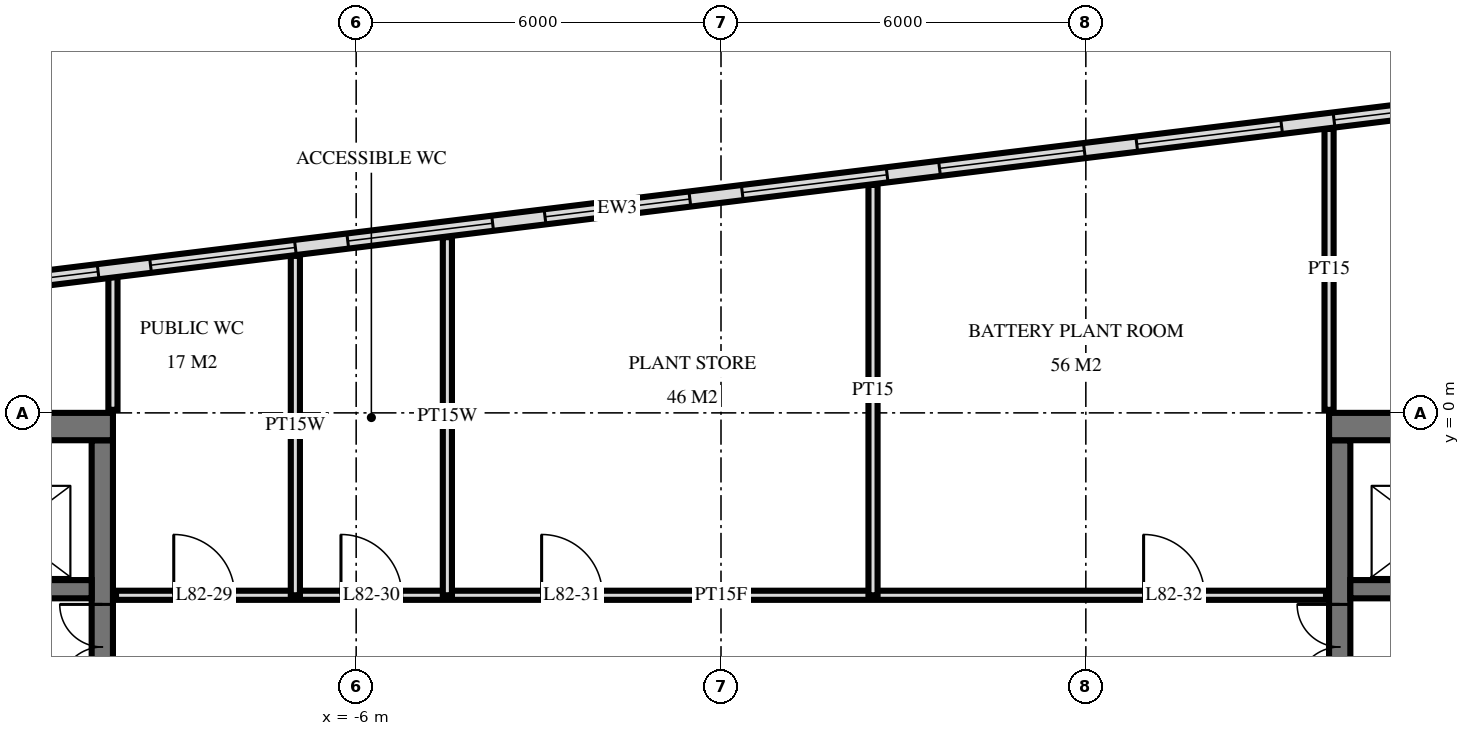
"""IFC4 building model, lengths in metres.
Left out: names, types, materials, properties, quantities, classifications, styles, units other than length and angle.
Written with IfcOpenShell. Run it as: python <this file> out.ifc"""

import sys

from ifc_helpers import new_model, si_unit, direction, frame, frame_2d, origin, place, context, subcontext, project, spatial, rectangle, extrude, element, fill, save


model = new_model("IFC4")
c1 = context("Model", 3, precision=1e-05, world=origin(), true_north=direction((0.0, 1.0)))
c2 = subcontext(c1, "Body", "Model", "MODEL_VIEW")
j1 = project(units=[si_unit("LENGTHUNIT", "METRE"), si_unit("PLANEANGLEUNIT", "RADIAN")], contexts=[c1])
p1 = place(None, origin())
s1 = spatial("IfcSite", under=j1, at=p1, CompositionType="ELEMENT")
p2 = place(p1, origin())
s2 = spatial("IfcBuilding", under=s1, at=p2, CompositionType="ELEMENT")
p3 = place(p2, frame((0.0, 0.0, 308.6)))
s3 = spatial("IfcBuildingStorey", under=s2, at=p3, CompositionType="ELEMENT", Elevation=308.6)
p4 = place(p3, frame((-19.5, -0.225, 0.0), z_axis=(0.0, 0.0, 1.0), x_axis=(1.0, 0.0, 0.0)))
e1 = element("IfcWall", 1, at=p4, inside=s3, PredefinedType="SHEAR", context=c2, shape_type="SweptSolid", body=[
    extrude(rectangle(XDim=9.5, YDim=0.45, at=frame_2d((4.75, 0.0))), origin(), (0.0, 0.0, 1.0), 6.0),
])
p5 = place(p3, frame((-10.175, -14.55, 0.0), z_axis=(0.0, 0.0, 1.0), x_axis=(0.0, 1.0, 0.0)))
e2 = element("IfcWall", 2, at=p5, inside=s3, PredefinedType="SHEAR", context=c2, shape_type="SweptSolid", body=[
    extrude(rectangle(XDim=14.1, YDim=0.35, at=frame_2d((7.05, 0.0))), origin(), (0.0, 0.0, 1.0), 6.0),
])
p6 = place(p5, frame((8.4, 0.0, 0.0)))
e3 = element("IfcOpeningElement", 3, at=p6, cuts=e2, PredefinedType="OPENING", context=c2, shape_type="SweptSolid", body=[
    extrude(rectangle(XDim=1.4, YDim=2.4, at=frame_2d((0.7, 1.2))), frame((0.0, 0.185, 0.0), z_axis=(0.0, -1.0, 0.0), x_axis=(1.0, 0.0, 0.0)), (0.0, 0.0, 1.0), 0.37),
])
p7 = place(p5, frame((10.0, 0.0, 0.0)))
e4 = element("IfcOpeningElement", 4, at=p7, cuts=e2, PredefinedType="OPENING", context=c2, shape_type="SweptSolid", body=[
    extrude(rectangle(XDim=1.4, YDim=2.4, at=frame_2d((0.7, 1.2))), frame((0.0, 0.185, 0.0), z_axis=(0.0, -1.0, 0.0), x_axis=(1.0, 0.0, 0.0)), (0.0, 0.0, 1.0), 0.37),
])
p8 = place(p5, frame((4.0, 0.0, 0.0)))
e5 = element("IfcOpeningElement", 5, at=p8, cuts=e2, PredefinedType="OPENING", context=c2, shape_type="SweptSolid", body=[
    extrude(rectangle(XDim=1.2, YDim=2.1, at=frame_2d((0.6, 1.05))), frame((0.0, 0.185, 0.0), z_axis=(0.0, -1.0, 0.0), x_axis=(1.0, 0.0, 0.0)), (0.0, 0.0, 1.0), 0.37),
])
p9 = place(p3, frame((-19.05, -2.9, 0.0), z_axis=(0.0, 0.0, 1.0), x_axis=(1.0, 0.0, 0.0)))
e6 = element("IfcWall", 6, at=p9, inside=s3, PredefinedType="SHEAR", context=c2, shape_type="SweptSolid", body=[
    extrude(rectangle(XDim=8.7, YDim=0.3, at=frame_2d((4.35, 0.0))), origin(), (0.0, 0.0, 1.0), 6.0),
])
p10 = place(p9, frame((6.8, 0.0, 0.0)))
e7 = element("IfcOpeningElement", 7, at=p10, cuts=e6, PredefinedType="OPENING", context=c2, shape_type="SweptSolid", body=[
    extrude(rectangle(XDim=1.1, YDim=2.1, at=frame_2d((0.55, 1.05))), frame((0.0, 0.16, 0.0), z_axis=(0.0, -1.0, 0.0), x_axis=(1.0, 0.0, 0.0)), (0.0, 0.0, 1.0), 0.32),
])
p11 = place(p9, frame((3.8, 0.0, 0.0)))
e8 = element("IfcOpeningElement", 8, at=p11, cuts=e6, PredefinedType="OPENING", context=c2, shape_type="SweptSolid", body=[
    extrude(rectangle(XDim=1.1, YDim=2.1, at=frame_2d((0.55, 1.05))), frame((0.0, 0.16, 0.0), z_axis=(0.0, -1.0, 0.0), x_axis=(1.0, 0.0, 0.0)), (0.0, 0.0, 1.0), 0.32),
])
p12 = place(p9, frame((0.9, 0.0, 0.0)))
e9 = element("IfcOpeningElement", 9, at=p12, cuts=e6, PredefinedType="OPENING", context=c2, shape_type="SweptSolid", body=[
    extrude(rectangle(XDim=0.9, YDim=2.1, at=frame_2d((0.45, 1.05))), frame((0.0, 0.16, 0.0), z_axis=(0.0, -1.0, 0.0), x_axis=(1.0, 0.0, 0.0)), (0.0, 0.0, 1.0), 0.32),
])
p13 = place(p3, frame((10.0, -0.225, 0.0), z_axis=(0.0, 0.0, 1.0), x_axis=(1.0, 0.0, 0.0)))
e10 = element("IfcWall", 10, at=p13, inside=s3, PredefinedType="SHEAR", context=c2, shape_type="SweptSolid", body=[
    extrude(rectangle(XDim=9.5, YDim=0.45, at=frame_2d((4.75, 0.0))), origin(), (0.0, 0.0, 1.0), 6.0),
])
p14 = place(p3, frame((10.175, -14.55, 0.0), z_axis=(0.0, 0.0, 1.0), x_axis=(0.0, 1.0, 0.0)))
e11 = element("IfcWall", 11, at=p14, inside=s3, PredefinedType="SHEAR", context=c2, shape_type="SweptSolid", body=[
    extrude(rectangle(XDim=14.1, YDim=0.35, at=frame_2d((7.05, 0.0))), origin(), (0.0, 0.0, 1.0), 6.0),
])
p15 = place(p14, frame((8.4, 0.0, 0.0)))
e12 = element("IfcOpeningElement", 12, at=p15, cuts=e11, PredefinedType="OPENING", context=c2, shape_type="SweptSolid", body=[
    extrude(rectangle(XDim=1.4, YDim=2.4, at=frame_2d((0.7, 1.2))), frame((0.0, 0.185, 0.0), z_axis=(0.0, -1.0, 0.0), x_axis=(1.0, 0.0, 0.0)), (0.0, 0.0, 1.0), 0.37),
])
p16 = place(p14, frame((10.0, 0.0, 0.0)))
e13 = element("IfcOpeningElement", 13, at=p16, cuts=e11, PredefinedType="OPENING", context=c2, shape_type="SweptSolid", body=[
    extrude(rectangle(XDim=1.4, YDim=2.4, at=frame_2d((0.7, 1.2))), frame((0.0, 0.185, 0.0), z_axis=(0.0, -1.0, 0.0), x_axis=(1.0, 0.0, 0.0)), (0.0, 0.0, 1.0), 0.37),
])
p17 = place(p14, frame((4.0, 0.0, 0.0)))
e14 = element("IfcOpeningElement", 14, at=p17, cuts=e11, PredefinedType="OPENING", context=c2, shape_type="SweptSolid", body=[
    extrude(rectangle(XDim=1.2, YDim=2.1, at=frame_2d((0.6, 1.05))), frame((0.0, 0.185, 0.0), z_axis=(0.0, -1.0, 0.0), x_axis=(1.0, 0.0, 0.0)), (0.0, 0.0, 1.0), 0.37),
])
p18 = place(p3, frame((10.35, -2.9, 0.0), z_axis=(0.0, 0.0, 1.0), x_axis=(1.0, 0.0, 0.0)))
e15 = element("IfcWall", 15, at=p18, inside=s3, PredefinedType="SHEAR", context=c2, shape_type="SweptSolid", body=[
    extrude(rectangle(XDim=8.7, YDim=0.3, at=frame_2d((4.35, 0.0))), origin(), (0.0, 0.0, 1.0), 6.0),
])
p19 = place(p18, frame((0.8, 0.0, 0.0)))
e16 = element("IfcOpeningElement", 16, at=p19, cuts=e15, PredefinedType="OPENING", context=c2, shape_type="SweptSolid", body=[
    extrude(rectangle(XDim=1.1, YDim=2.1, at=frame_2d((0.55, 1.05))), frame((0.0, 0.16, 0.0), z_axis=(0.0, -1.0, 0.0), x_axis=(1.0, 0.0, 0.0)), (0.0, 0.0, 1.0), 0.32),
])
p20 = place(p18, frame((3.8, 0.0, 0.0)))
e17 = element("IfcOpeningElement", 17, at=p20, cuts=e15, PredefinedType="OPENING", context=c2, shape_type="SweptSolid", body=[
    extrude(rectangle(XDim=1.1, YDim=2.1, at=frame_2d((0.55, 1.05))), frame((0.0, 0.16, 0.0), z_axis=(0.0, -1.0, 0.0), x_axis=(1.0, 0.0, 0.0)), (0.0, 0.0, 1.0), 0.32),
])
p21 = place(p18, frame((6.9, 0.0, 0.0)))
e18 = element("IfcOpeningElement", 18, at=p21, cuts=e15, PredefinedType="OPENING", context=c2, shape_type="SweptSolid", body=[
    extrude(rectangle(XDim=0.9, YDim=2.1, at=frame_2d((0.45, 1.05))), frame((0.0, 0.16, 0.0), z_axis=(0.0, -1.0, 0.0), x_axis=(1.0, 0.0, 0.0)), (0.0, 0.0, 1.0), 0.32),
])
p22 = place(p3, frame((16.138, 5.561, 0.0), z_axis=(0.0, 0.0, 1.0), x_axis=(-0.992546726876, -0.121864658405, 0.0)))
e19 = element("IfcWall", 19, at=p22, inside=s3, PredefinedType="SOLIDWALL", context=c2, shape_type="SweptSolid", body=[
    extrude(rectangle(XDim=35.951, YDim=0.25, at=frame_2d((17.975, 0.0))), origin(), (0.0, 0.0, 1.0), 5.72),
])
p23 = place(p22, frame((0.434, 0.0, 0.858)))
e20 = element("IfcOpeningElement", 20, at=p23, cuts=e19, PredefinedType="OPENING", context=c2, shape_type="SweptSolid", body=[
    extrude(rectangle(XDim=2.4, YDim=3.6, at=frame_2d((1.2, 1.8))), frame((0.0, 0.135, 0.0), z_axis=(0.0, -1.0, 0.0), x_axis=(1.0, 0.0, 0.0)), (0.0, 0.0, 1.0), 0.27),
])
p24 = place(p22, frame((3.702, 0.0, 0.858)))
e21 = element("IfcOpeningElement", 21, at=p24, cuts=e19, PredefinedType="OPENING", context=c2, shape_type="SweptSolid", body=[
    extrude(rectangle(XDim=2.4, YDim=3.6, at=frame_2d((1.2, 1.8))), frame((0.0, 0.135, 0.0), z_axis=(0.0, -1.0, 0.0), x_axis=(1.0, 0.0, 0.0)), (0.0, 0.0, 1.0), 0.27),
])
p25 = place(p22, frame((6.971, 0.0, 0.858)))
e22 = element("IfcOpeningElement", 22, at=p25, cuts=e19, PredefinedType="OPENING", context=c2, shape_type="SweptSolid", body=[
    extrude(rectangle(XDim=2.4, YDim=3.6, at=frame_2d((1.2, 1.8))), frame((0.0, 0.135, 0.0), z_axis=(0.0, -1.0, 0.0), x_axis=(1.0, 0.0, 0.0)), (0.0, 0.0, 1.0), 0.27),
])
p26 = place(p22, frame((10.239, 0.0, 0.858)))
e23 = element("IfcOpeningElement", 23, at=p26, cuts=e19, PredefinedType="OPENING", context=c2, shape_type="SweptSolid", body=[
    extrude(rectangle(XDim=2.4, YDim=3.6, at=frame_2d((1.2, 1.8))), frame((0.0, 0.135, 0.0), z_axis=(0.0, -1.0, 0.0), x_axis=(1.0, 0.0, 0.0)), (0.0, 0.0, 1.0), 0.27),
])
p27 = place(p22, frame((13.507, 0.0, 0.858)))
e24 = element("IfcOpeningElement", 24, at=p27, cuts=e19, PredefinedType="OPENING", context=c2, shape_type="SweptSolid", body=[
    extrude(rectangle(XDim=2.4, YDim=3.6, at=frame_2d((1.2, 1.8))), frame((0.0, 0.135, 0.0), z_axis=(0.0, -1.0, 0.0), x_axis=(1.0, 0.0, 0.0)), (0.0, 0.0, 1.0), 0.27),
])
p28 = place(p22, frame((16.775, 0.0, 0.858)))
e25 = element("IfcOpeningElement", 25, at=p28, cuts=e19, PredefinedType="OPENING", context=c2, shape_type="SweptSolid", body=[
    extrude(rectangle(XDim=2.4, YDim=3.6, at=frame_2d((1.2, 1.8))), frame((0.0, 0.135, 0.0), z_axis=(0.0, -1.0, 0.0), x_axis=(1.0, 0.0, 0.0)), (0.0, 0.0, 1.0), 0.27),
])
p29 = place(p22, frame((20.044, 0.0, 0.858)))
e26 = element("IfcOpeningElement", 26, at=p29, cuts=e19, PredefinedType="OPENING", context=c2, shape_type="SweptSolid", body=[
    extrude(rectangle(XDim=2.4, YDim=3.6, at=frame_2d((1.2, 1.8))), frame((0.0, 0.135, 0.0), z_axis=(0.0, -1.0, 0.0), x_axis=(1.0, 0.0, 0.0)), (0.0, 0.0, 1.0), 0.27),
])
p30 = place(p22, frame((23.312, 0.0, 0.858)))
e27 = element("IfcOpeningElement", 27, at=p30, cuts=e19, PredefinedType="OPENING", context=c2, shape_type="SweptSolid", body=[
    extrude(rectangle(XDim=2.4, YDim=3.6, at=frame_2d((1.2, 1.8))), frame((0.0, 0.135, 0.0), z_axis=(0.0, -1.0, 0.0), x_axis=(1.0, 0.0, 0.0)), (0.0, 0.0, 1.0), 0.27),
])
p31 = place(p22, frame((26.58, 0.0, 0.858)))
e28 = element("IfcOpeningElement", 28, at=p31, cuts=e19, PredefinedType="OPENING", context=c2, shape_type="SweptSolid", body=[
    extrude(rectangle(XDim=2.4, YDim=3.6, at=frame_2d((1.2, 1.8))), frame((0.0, 0.135, 0.0), z_axis=(0.0, -1.0, 0.0), x_axis=(1.0, 0.0, 0.0)), (0.0, 0.0, 1.0), 0.27),
])
p32 = place(p22, frame((29.848, 0.0, 0.858)))
e29 = element("IfcOpeningElement", 29, at=p32, cuts=e19, PredefinedType="OPENING", context=c2, shape_type="SweptSolid", body=[
    extrude(rectangle(XDim=2.4, YDim=3.6, at=frame_2d((1.2, 1.8))), frame((0.0, 0.135, 0.0), z_axis=(0.0, -1.0, 0.0), x_axis=(1.0, 0.0, 0.0)), (0.0, 0.0, 1.0), 0.27),
])
p33 = place(p22, frame((33.117, 0.0, 0.858)))
e30 = element("IfcOpeningElement", 30, at=p33, cuts=e19, PredefinedType="OPENING", context=c2, shape_type="SweptSolid", body=[
    extrude(rectangle(XDim=2.4, YDim=3.6, at=frame_2d((1.2, 1.8))), frame((0.0, 0.135, 0.0), z_axis=(0.0, -1.0, 0.0), x_axis=(1.0, 0.0, 0.0)), (0.0, 0.0, 1.0), 0.27),
])
p34 = place(p3, frame((10.0, 0.05, 0.0), z_axis=(0.0, 0.0, 1.0), x_axis=(0.0, 1.0, 0.0)))
e31 = element("IfcWall", 31, at=p34, inside=s3, PredefinedType="PARTITIONING", context=c2, shape_type="SweptSolid", body=[
    extrude(rectangle(XDim=4.62, YDim=0.15, at=frame_2d((2.31, 0.0))), origin(), (0.0, 0.0, 1.0), 5.7),
])
p35 = place(p3, frame((2.5, -3.0, 0.0), z_axis=(0.0, 0.0, 1.0), x_axis=(0.0, 1.0, 0.0)))
e32 = element("IfcWall", 32, at=p35, inside=s3, PredefinedType="PARTITIONING", context=c2, shape_type="SweptSolid", body=[
    extrude(rectangle(XDim=6.749, YDim=0.15, at=frame_2d((3.375, 0.0))), origin(), (0.0, 0.0, 1.0), 5.7),
])
p36 = place(p3, frame((-4.5, -3.0, 0.0), z_axis=(0.0, 0.0, 1.0), x_axis=(0.0, 1.0, 0.0)))
e33 = element("IfcWall", 33, at=p36, inside=s3, PredefinedType="PLUMBINGWALL", context=c2, shape_type="SweptSolid", body=[
    extrude(rectangle(XDim=5.889, YDim=0.15, at=frame_2d((2.945, 0.0))), origin(), (0.0, 0.0, 1.0), 5.7),
])
p37 = place(p3, frame((-7.0, -3.0, 0.0), z_axis=(0.0, 0.0, 1.0), x_axis=(0.0, 1.0, 0.0)))
e34 = element("IfcWall", 34, at=p37, inside=s3, PredefinedType="PLUMBINGWALL", context=c2, shape_type="SweptSolid", body=[
    extrude(rectangle(XDim=5.583, YDim=0.15, at=frame_2d((2.791, 0.0))), origin(), (0.0, 0.0, 1.0), 5.7),
])
p38 = place(p3, frame((-10.0, 0.05, 0.0), z_axis=(0.0, 0.0, 1.0), x_axis=(0.0, 1.0, 0.0)))
e35 = element("IfcWall", 35, at=p38, inside=s3, PredefinedType="PLUMBINGWALL", context=c2, shape_type="SweptSolid", body=[
    extrude(rectangle(XDim=2.247, YDim=0.15, at=frame_2d((1.123, 0.0))), origin(), (0.0, 0.0, 1.0), 5.7),
])
p39 = place(p3, frame((-9.95, -3.0, 0.0), z_axis=(0.0, 0.0, 1.0), x_axis=(1.0, 0.0, 0.0)))
e36 = element("IfcWall", 36, at=p39, inside=s3, PredefinedType="PARTITIONING", context=c2, shape_type="SweptSolid", body=[
    extrude(rectangle(XDim=19.9, YDim=0.15, at=frame_2d((9.95, 0.0))), origin(), (0.0, 0.0, 1.0), 5.7),
])
p40 = place(p39, frame((0.95, 0.0, 0.0)))
e37 = element("IfcOpeningElement", 37, at=p40, cuts=e36, PredefinedType="OPENING", context=c2, shape_type="SweptSolid", body=[
    extrude(rectangle(XDim=1.0, YDim=2.1, at=frame_2d((0.5, 1.05))), frame((0.0, 0.085, 0.0), z_axis=(0.0, -1.0, 0.0), x_axis=(1.0, 0.0, 0.0)), (0.0, 0.0, 1.0), 0.17),
])
p41 = place(p39, frame((3.7, 0.0, 0.0)))
e38 = element("IfcOpeningElement", 38, at=p41, cuts=e36, PredefinedType="OPENING", context=c2, shape_type="SweptSolid", body=[
    extrude(rectangle(XDim=1.0, YDim=2.1, at=frame_2d((0.5, 1.05))), frame((0.0, 0.085, 0.0), z_axis=(0.0, -1.0, 0.0), x_axis=(1.0, 0.0, 0.0)), (0.0, 0.0, 1.0), 0.17),
])
p42 = place(p39, frame((7.0, 0.0, 0.0)))
e39 = element("IfcOpeningElement", 39, at=p42, cuts=e36, PredefinedType="OPENING", context=c2, shape_type="SweptSolid", body=[
    extrude(rectangle(XDim=1.0, YDim=2.1, at=frame_2d((0.5, 1.05))), frame((0.0, 0.085, 0.0), z_axis=(0.0, -1.0, 0.0), x_axis=(1.0, 0.0, 0.0)), (0.0, 0.0, 1.0), 0.17),
])
p43 = place(p39, frame((16.9, 0.0, 0.0)))
e40 = element("IfcOpeningElement", 40, at=p43, cuts=e36, PredefinedType="OPENING", context=c2, shape_type="SweptSolid", body=[
    extrude(rectangle(XDim=1.0, YDim=2.1, at=frame_2d((0.5, 1.05))), frame((0.0, 0.085, 0.0), z_axis=(0.0, -1.0, 0.0), x_axis=(1.0, 0.0, 0.0)), (0.0, 0.0, 1.0), 0.17),
])
p44 = place(p24, origin())
e41 = element("IfcWindow", 41, at=p44, inside=s3, PartitioningType="SINGLE_PANEL", PredefinedType="USERDEFINED", context=c2, shape_type="SweptSolid", body=[
    extrude(rectangle(XDim=2.4, YDim=3.6, at=frame_2d((1.2, 1.8))), frame((0.0, 0.125, 0.0), z_axis=(0.0, -1.0, 0.0), x_axis=(1.0, 0.0, 0.0)), (0.0, 0.0, 1.0), 0.06),
])
fill(e21, e41)
p45 = place(p25, origin())
e42 = element("IfcWindow", 42, at=p45, inside=s3, PartitioningType="SINGLE_PANEL", PredefinedType="USERDEFINED", context=c2, shape_type="SweptSolid", body=[
    extrude(rectangle(XDim=2.4, YDim=3.6, at=frame_2d((1.2, 1.8))), frame((0.0, 0.125, 0.0), z_axis=(0.0, -1.0, 0.0), x_axis=(1.0, 0.0, 0.0)), (0.0, 0.0, 1.0), 0.06),
])
fill(e22, e42)
p46 = place(p26, origin())
e43 = element("IfcWindow", 43, at=p46, inside=s3, PartitioningType="SINGLE_PANEL", PredefinedType="USERDEFINED", context=c2, shape_type="SweptSolid", body=[
    extrude(rectangle(XDim=2.4, YDim=3.6, at=frame_2d((1.2, 1.8))), frame((0.0, 0.125, 0.0), z_axis=(0.0, -1.0, 0.0), x_axis=(1.0, 0.0, 0.0)), (0.0, 0.0, 1.0), 0.06),
])
fill(e23, e43)
p47 = place(p27, origin())
e44 = element("IfcWindow", 44, at=p47, inside=s3, PartitioningType="SINGLE_PANEL", PredefinedType="USERDEFINED", context=c2, shape_type="SweptSolid", body=[
    extrude(rectangle(XDim=2.4, YDim=3.6, at=frame_2d((1.2, 1.8))), frame((0.0, 0.125, 0.0), z_axis=(0.0, -1.0, 0.0), x_axis=(1.0, 0.0, 0.0)), (0.0, 0.0, 1.0), 0.06),
])
fill(e24, e44)
p48 = place(p28, origin())
e45 = element("IfcWindow", 45, at=p48, inside=s3, PartitioningType="SINGLE_PANEL", PredefinedType="USERDEFINED", context=c2, shape_type="SweptSolid", body=[
    extrude(rectangle(XDim=2.4, YDim=3.6, at=frame_2d((1.2, 1.8))), frame((0.0, 0.125, 0.0), z_axis=(0.0, -1.0, 0.0), x_axis=(1.0, 0.0, 0.0)), (0.0, 0.0, 1.0), 0.06),
])
fill(e25, e45)
p49 = place(p29, origin())
e46 = element("IfcWindow", 46, at=p49, inside=s3, PartitioningType="SINGLE_PANEL", PredefinedType="USERDEFINED", context=c2, shape_type="SweptSolid", body=[
    extrude(rectangle(XDim=2.4, YDim=3.6, at=frame_2d((1.2, 1.8))), frame((0.0, 0.125, 0.0), z_axis=(0.0, -1.0, 0.0), x_axis=(1.0, 0.0, 0.0)), (0.0, 0.0, 1.0), 0.06),
])
fill(e26, e46)
p50 = place(p30, origin())
e47 = element("IfcWindow", 47, at=p50, inside=s3, PartitioningType="SINGLE_PANEL", PredefinedType="USERDEFINED", context=c2, shape_type="SweptSolid", body=[
    extrude(rectangle(XDim=2.4, YDim=3.6, at=frame_2d((1.2, 1.8))), frame((0.0, 0.125, 0.0), z_axis=(0.0, -1.0, 0.0), x_axis=(1.0, 0.0, 0.0)), (0.0, 0.0, 1.0), 0.06),
])
fill(e27, e47)
p51 = place(p31, origin())
e48 = element("IfcWindow", 48, at=p51, inside=s3, PartitioningType="SINGLE_PANEL", PredefinedType="USERDEFINED", context=c2, shape_type="SweptSolid", body=[
    extrude(rectangle(XDim=2.4, YDim=3.6, at=frame_2d((1.2, 1.8))), frame((0.0, 0.125, 0.0), z_axis=(0.0, -1.0, 0.0), x_axis=(1.0, 0.0, 0.0)), (0.0, 0.0, 1.0), 0.06),
])
fill(e28, e48)
p52 = place(p7, origin())
e49 = element("IfcDoor", 49, at=p52, inside=s3, OperationType="DOUBLE_DOOR_SINGLE_SWING", PredefinedType="DOOR", context=c2, shape_type="SweptSolid", body=[
    extrude(rectangle(XDim=1.4, YDim=2.4, at=frame_2d((0.7, 1.2))), frame((0.0, 0.025, 0.0), z_axis=(0.0, -1.0, 0.0), x_axis=(1.0, 0.0, 0.0)), (0.0, 0.0, 1.0), 0.05),
])
fill(e4, e49)
p53 = place(p16, origin())
e50 = element("IfcDoor", 50, at=p53, inside=s3, OperationType="DOUBLE_DOOR_SINGLE_SWING", PredefinedType="DOOR", context=c2, shape_type="SweptSolid", body=[
    extrude(rectangle(XDim=1.4, YDim=2.4, at=frame_2d((0.7, 1.2))), frame((0.0, 0.025, 0.0), z_axis=(0.0, -1.0, 0.0), x_axis=(1.0, 0.0, 0.0)), (0.0, 0.0, 1.0), 0.05),
])
fill(e13, e50)
p54 = place(p40, origin())
e51 = element("IfcDoor", 51, at=p54, inside=s3, OperationType="SINGLE_SWING_RIGHT", PredefinedType="DOOR", context=c2, shape_type="SweptSolid", body=[
    extrude(rectangle(XDim=1.0, YDim=2.1, at=frame_2d((0.5, 1.05))), frame((0.0, 0.025, 0.0), z_axis=(0.0, -1.0, 0.0), x_axis=(1.0, 0.0, 0.0)), (0.0, 0.0, 1.0), 0.05),
])
fill(e37, e51)
p55 = place(p41, origin())
e52 = element("IfcDoor", 52, at=p55, inside=s3, OperationType="SINGLE_SWING_RIGHT", PredefinedType="DOOR", context=c2, shape_type="SweptSolid", body=[
    extrude(rectangle(XDim=1.0, YDim=2.1, at=frame_2d((0.5, 1.05))), frame((0.0, 0.025, 0.0), z_axis=(0.0, -1.0, 0.0), x_axis=(1.0, 0.0, 0.0)), (0.0, 0.0, 1.0), 0.05),
])
fill(e38, e52)
p56 = place(p42, origin())
e53 = element("IfcDoor", 53, at=p56, inside=s3, OperationType="SINGLE_SWING_RIGHT", PredefinedType="DOOR", context=c2, shape_type="SweptSolid", body=[
    extrude(rectangle(XDim=1.0, YDim=2.1, at=frame_2d((0.5, 1.05))), frame((0.0, 0.025, 0.0), z_axis=(0.0, -1.0, 0.0), x_axis=(1.0, 0.0, 0.0)), (0.0, 0.0, 1.0), 0.05),
])
fill(e39, e53)
p57 = place(p43, origin())
e54 = element("IfcDoor", 54, at=p57, inside=s3, OperationType="SINGLE_SWING_RIGHT", PredefinedType="DOOR", context=c2, shape_type="SweptSolid", body=[
    extrude(rectangle(XDim=1.0, YDim=2.1, at=frame_2d((0.5, 1.05))), frame((0.0, 0.025, 0.0), z_axis=(0.0, -1.0, 0.0), x_axis=(1.0, 0.0, 0.0)), (0.0, 0.0, 1.0), 0.05),
])
fill(e40, e54)
save(model, sys.argv[1])
